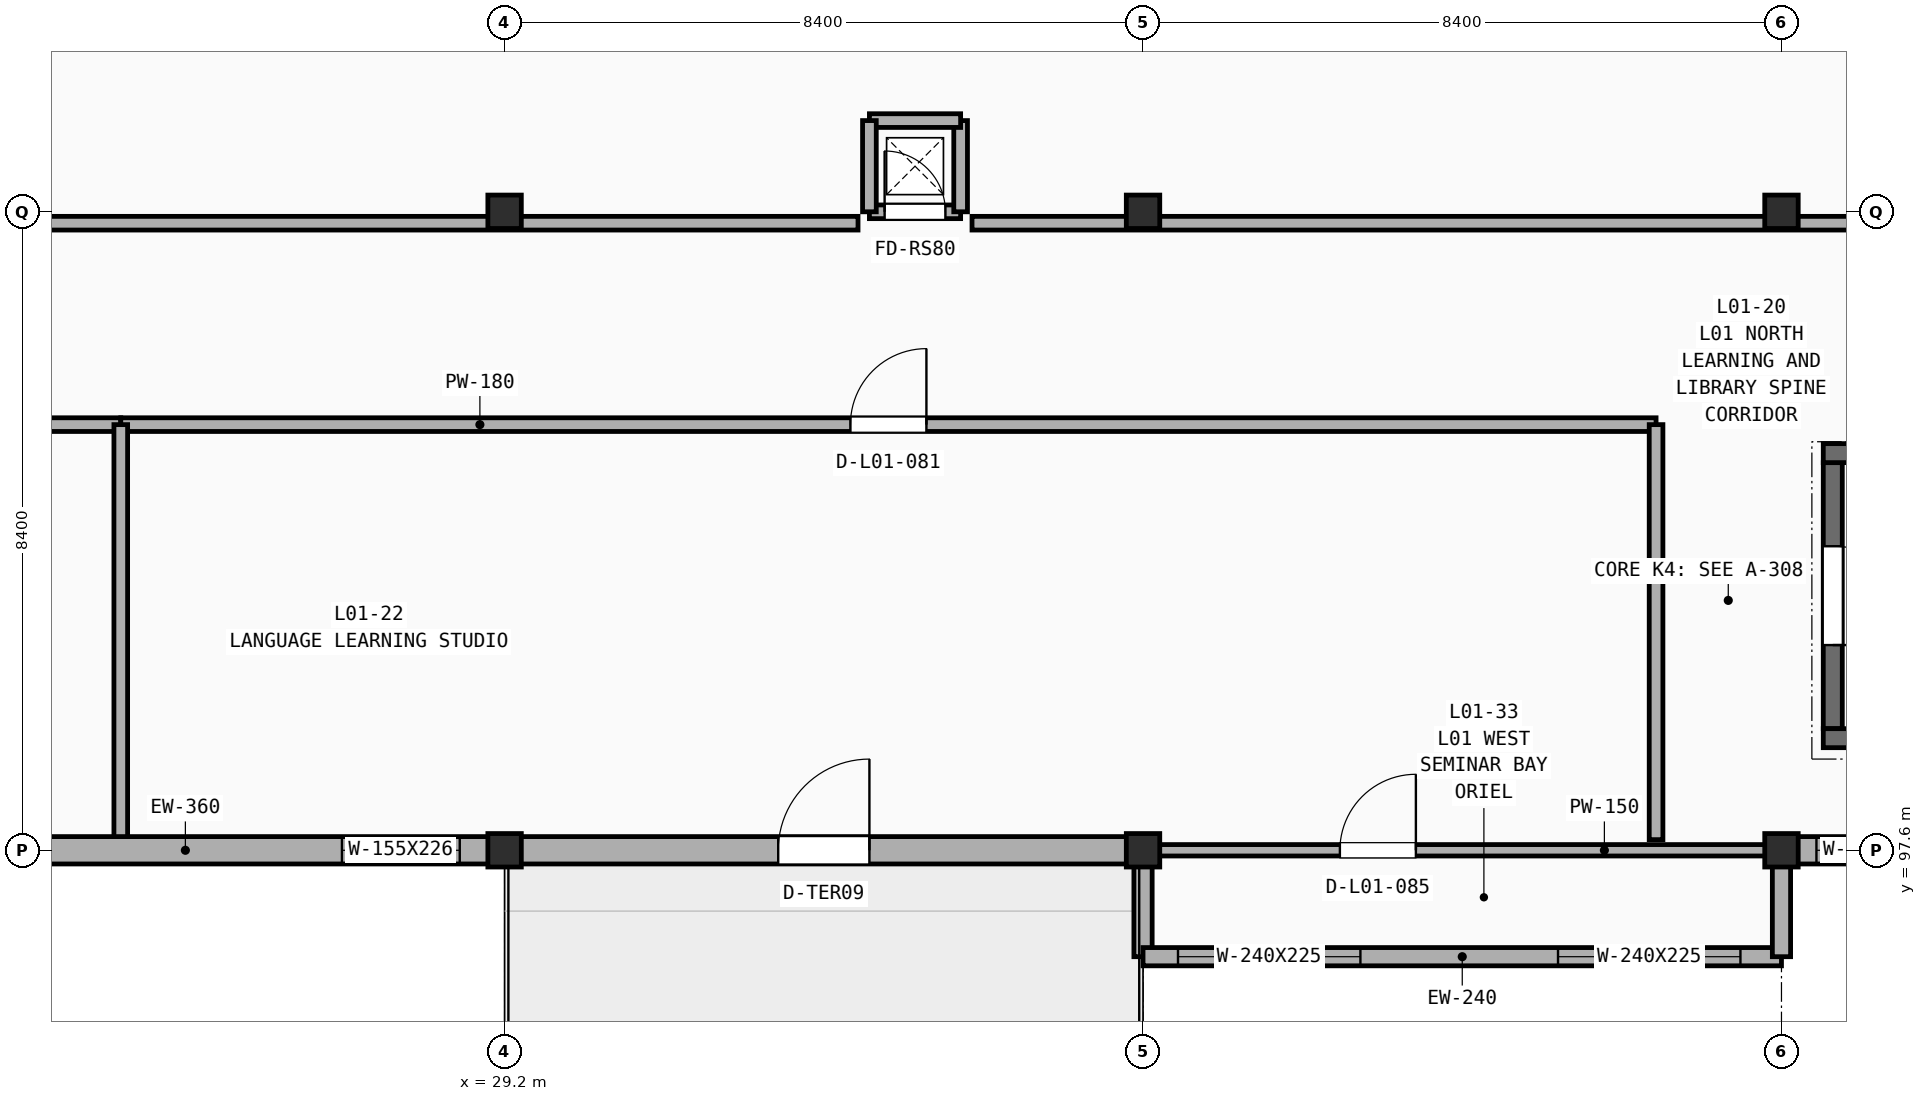
"""IFC4 building model, lengths in metres.
Left out: names, types, materials, properties, quantities, classifications, styles, units other than length and angle.
Written with IfcOpenShell. Run it as: python <this file> out.ifc"""

import sys

from ifc_helpers import new_model, si_unit, direction, frame, frame_2d, origin, origin_2d, place, context, subcontext, project, spatial, rectangle, extrude, element, fill, save


model = new_model("IFC4")
c1 = context("Model", 3, precision=1e-05, world=origin(), true_north=direction((0.0, 1.0)))
c2 = subcontext(c1, "Body", "Model", "MODEL_VIEW")
j1 = project(units=[si_unit("LENGTHUNIT", "METRE"), si_unit("PLANEANGLEUNIT", "RADIAN")], contexts=[c1])
p1 = place(None, origin())
s1 = spatial("IfcSite", under=j1, at=p1, CompositionType="ELEMENT")
p2 = place(p1, origin())
s2 = spatial("IfcBuilding", under=s1, at=p2, CompositionType="ELEMENT")
p3 = place(p2, frame((0.0, 0.0, 5.4)))
s3 = spatial("IfcBuildingStorey", under=s2, at=p3, CompositionType="ELEMENT", Elevation=5.4)
for number, where, z_axis, x_axis in (
    (1, (29.2, 97.6, 0.0), (0.0, 0.0, 1.0), (1.0, 0.0, 0.0)),
    (2, (29.2, 106.0, 0.0), (0.0, 0.0, 1.0), (1.0, 0.0, 0.0)),
    (3, (37.6, 97.6, 0.0), (0.0, 0.0, 1.0), (1.0, 0.0, 0.0)),
    (4, (37.6, 106.0, 0.0), (0.0, 0.0, 1.0), (1.0, 0.0, 0.0)),
    (5, (46.0, 97.6, 0.0), (0.0, 0.0, 1.0), (1.0, 0.0, 0.0)),
    (6, (46.0, 106.0, 0.0), (0.0, 0.0, 1.0), (1.0, 0.0, 0.0)),
):
    element("IfcColumn", number, at=place(p3, frame(where, z_axis=z_axis, x_axis=x_axis)), inside=s3, PredefinedType="COLUMN", context=c2, shape_type="SweptSolid", body=[
        extrude(rectangle(XDim=0.44, YDim=0.44, at=origin_2d()), origin(), (0.0, 0.0, 1.0), 4.2),
    ])
p4 = place(p3, frame((4.14, 103.2, 0.0), z_axis=(0.0, 0.0, 1.0), x_axis=(1.0, 0.0, 0.0)))
e7 = element("IfcWall", 7, at=p4, inside=s3, PredefinedType="PARTITIONING", context=c2, shape_type="SweptSolid", body=[
    extrude(rectangle(XDim=20.01, YDim=0.18, at=frame_2d((10.005, 0.0))), origin(), (0.0, 0.0, 1.0), 3.37),
])
p5 = place(p4, frame((9.505, 0.0, -0.01)))
e8 = element("IfcOpeningElement", 8, at=p5, cuts=e7, PredefinedType="OPENING", context=c2, shape_type="SweptSolid", body=[
    extrude(rectangle(XDim=1.0, YDim=2.16, at=frame_2d((0.5, 1.08))), frame((0.0, 0.1, 0.0), z_axis=(0.0, -1.0, 0.0), x_axis=(1.0, 0.0, 0.0)), (0.0, 0.0, 1.0), 0.2),
])
p6 = place(p3, frame((24.15, 103.2, 0.0), z_axis=(0.0, 0.0, 1.0), x_axis=(1.0, 0.0, 0.0)))
e9 = element("IfcWall", 9, at=p6, inside=s3, PredefinedType="PARTITIONING", context=c2, shape_type="SweptSolid", body=[
    extrude(rectangle(XDim=20.2, YDim=0.18, at=frame_2d((10.1, 0.0))), origin(), (0.0, 0.0, 1.0), 3.37),
])
p7 = place(p6, frame((9.6, 0.0, -0.01)))
e10 = element("IfcOpeningElement", 10, at=p7, cuts=e9, PredefinedType="OPENING", context=c2, shape_type="SweptSolid", body=[
    extrude(rectangle(XDim=1.0, YDim=2.16, at=frame_2d((0.5, 1.08))), frame((0.0, 0.1, 0.0), z_axis=(0.0, -1.0, 0.0), x_axis=(1.0, 0.0, 0.0)), (0.0, 0.0, 1.0), 0.2),
])
for number, where, z_axis, x_axis in (
    (11, (24.15, 97.74, 0.0), (0.0, 0.0, 1.0), (0.0, 1.0, 0.0)),
    (12, (44.35, 97.74, 0.0), (0.0, 0.0, 1.0), (0.0, 1.0, 0.0)),
):
    element("IfcWall", number, at=place(p3, frame(where, z_axis=z_axis, x_axis=x_axis)), inside=s3, PredefinedType="PARTITIONING", context=c2, shape_type="SweptSolid", body=[
        extrude(rectangle(XDim=5.46, YDim=0.18, at=frame_2d((2.73, 0.0))), origin(), (0.0, 0.0, 1.0), 3.52),
    ])
p8 = place(p3, frame((37.6, 97.6, 0.0), z_axis=(0.0, 0.0, 1.0), x_axis=(1.0, 0.0, 0.0)))
e13 = element("IfcWall", 13, at=p8, inside=s3, PredefinedType="PARTITIONING", context=c2, shape_type="SweptSolid", body=[
    extrude(rectangle(XDim=8.4, YDim=0.15, at=frame_2d((4.2, 0.0))), origin(), (0.0, 0.0, 1.0), 3.15),
])
p9 = place(p8, frame((2.59, 0.0, -0.01)))
e14 = element("IfcOpeningElement", 14, at=p9, cuts=e13, PredefinedType="OPENING", context=c2, shape_type="SweptSolid", body=[
    extrude(rectangle(XDim=1.0, YDim=2.16, at=frame_2d((0.5, 1.08))), frame((0.0, 0.085, 0.0), z_axis=(0.0, -1.0, 0.0), x_axis=(1.0, 0.0, 0.0)), (0.0, 0.0, 1.0), 0.17),
])
p10 = place(p3, frame((4.14, 105.85, 0.0), z_axis=(0.0, 0.0, 1.0), x_axis=(1.0, 0.0, 0.0)))
e15 = element("IfcWall", 15, at=p10, inside=s3, PredefinedType="PARTITIONING", context=c2, shape_type="SweptSolid", body=[
    extrude(rectangle(XDim=29.71, YDim=0.18, at=frame_2d((14.855, 0.0))), origin(), (0.0, 0.0, 1.0), 3.25),
])
p11 = place(p10, frame((12.649, 0.0, -0.01)))
e16 = element("IfcOpeningElement", 16, at=p11, cuts=e15, PredefinedType="OPENING", context=c2, shape_type="SweptSolid", body=[
    extrude(rectangle(XDim=1.6, YDim=2.21, at=frame_2d((0.8, 1.105))), frame((0.0, 0.1, 0.0), z_axis=(0.0, -1.0, 0.0), x_axis=(1.0, 0.0, 0.0)), (0.0, 0.0, 1.0), 0.2),
])
p12 = place(p3, frame((35.35, 105.85, 0.0), z_axis=(0.0, 0.0, 1.0), x_axis=(1.0, 0.0, 0.0)))
e17 = element("IfcWall", 17, at=p12, inside=s3, PredefinedType="PARTITIONING", context=c2, shape_type="SweptSolid", body=[
    extrude(rectangle(XDim=17.7, YDim=0.18, at=frame_2d((8.85, 0.0))), origin(), (0.0, 0.0, 1.0), 3.25),
])
p13 = place(p3, frame((20.8, 97.6, 0.0), z_axis=(0.0, 0.0, 1.0), x_axis=(1.0, 0.0, 0.0)))
e18 = element("IfcWall", 18, at=p13, inside=s3, PredefinedType="SOLIDWALL", context=c2, shape_type="SweptSolid", body=[
    extrude(rectangle(XDim=8.4, YDim=0.36, at=frame_2d((4.2, 0.0))), origin(), (0.0, 0.0, 1.0), 3.15),
])
p14 = place(p13, frame((0.46, 0.0, 0.75)))
e19 = element("IfcOpeningElement", 19, at=p14, cuts=e18, PredefinedType="OPENING", context=c2, shape_type="SweptSolid", body=[
    extrude(rectangle(XDim=1.55, YDim=2.26, at=frame_2d((0.775, 1.13))), frame((0.0, 0.19, 0.0), z_axis=(0.0, -1.0, 0.0), x_axis=(1.0, 0.0, 0.0)), (0.0, 0.0, 1.0), 0.38),
])
p15 = place(p13, frame((6.26, 0.0, 0.75)))
e20 = element("IfcOpeningElement", 20, at=p15, cuts=e18, PredefinedType="OPENING", context=c2, shape_type="SweptSolid", body=[
    extrude(rectangle(XDim=1.55, YDim=2.26, at=frame_2d((0.775, 1.13))), frame((0.0, 0.19, 0.0), z_axis=(0.0, -1.0, 0.0), x_axis=(1.0, 0.0, 0.0)), (0.0, 0.0, 1.0), 0.38),
])
p16 = place(p3, frame((29.2, 97.6, 0.0), z_axis=(0.0, 0.0, 1.0), x_axis=(1.0, 0.0, 0.0)))
e21 = element("IfcWall", 21, at=p16, inside=s3, PredefinedType="SOLIDWALL", context=c2, shape_type="SweptSolid", body=[
    extrude(rectangle(XDim=8.4, YDim=0.36, at=frame_2d((4.2, 0.0))), origin(), (0.0, 0.0, 1.0), 3.15),
])
p17 = place(p16, frame((3.6, 0.0, -0.01)))
e22 = element("IfcOpeningElement", 22, at=p17, cuts=e21, PredefinedType="OPENING", context=c2, shape_type="SweptSolid", body=[
    extrude(rectangle(XDim=1.2, YDim=2.21, at=frame_2d((0.6, 1.105))), frame((0.0, 0.19, 0.0), z_axis=(0.0, -1.0, 0.0), x_axis=(1.0, 0.0, 0.0)), (0.0, 0.0, 1.0), 0.38),
])
p18 = place(p3, frame((46.0, 97.6, 0.0), z_axis=(0.0, 0.0, 1.0), x_axis=(1.0, 0.0, 0.0)))
e23 = element("IfcWall", 23, at=p18, inside=s3, PredefinedType="SOLIDWALL", context=c2, shape_type="SweptSolid", body=[
    extrude(rectangle(XDim=4.8, YDim=0.36, at=frame_2d((2.4, 0.0))), origin(), (0.0, 0.0, 1.0), 3.37),
])
p19 = place(p18, frame((0.46, 0.0, 0.75)))
e24 = element("IfcOpeningElement", 24, at=p19, cuts=e23, PredefinedType="OPENING", context=c2, shape_type="SweptSolid", body=[
    extrude(rectangle(XDim=1.55, YDim=2.45, at=frame_2d((0.775, 1.225))), frame((0.0, 0.19, 0.0), z_axis=(0.0, -1.0, 0.0), x_axis=(1.0, 0.0, 0.0)), (0.0, 0.0, 1.0), 0.38),
])
p20 = place(p18, frame((2.66, 0.0, 0.75)))
e25 = element("IfcOpeningElement", 25, at=p20, cuts=e23, PredefinedType="OPENING", context=c2, shape_type="SweptSolid", body=[
    extrude(rectangle(XDim=1.55, YDim=2.45, at=frame_2d((0.775, 1.225))), frame((0.0, 0.19, 0.0), z_axis=(0.0, -1.0, 0.0), x_axis=(1.0, 0.0, 0.0)), (0.0, 0.0, 1.0), 0.38),
])
p21 = place(p3, frame((37.6, 97.45, 0.0), z_axis=(0.0, 0.0, 1.0), x_axis=(0.0, -1.0, 0.0)))
e26 = element("IfcWall", 26, at=p21, inside=s3, PredefinedType="SOLIDWALL", context=c2, shape_type="SweptSolid", body=[
    extrude(rectangle(XDim=1.25, YDim=0.24, at=frame_2d((0.625, 0.0))), origin(), (0.0, 0.0, 1.0), 3.15),
])
p22 = place(p3, frame((37.6, 96.2, 0.0), z_axis=(0.0, 0.0, 1.0), x_axis=(1.0, 0.0, 0.0)))
e27 = element("IfcWall", 27, at=p22, inside=s3, PredefinedType="SOLIDWALL", context=c2, shape_type="SweptSolid", body=[
    extrude(rectangle(XDim=8.4, YDim=0.24, at=frame_2d((4.2, 0.0))), origin(), (0.0, 0.0, 1.0), 3.15),
])
p23 = place(p22, frame((0.46, 0.0, 0.65)))
e28 = element("IfcOpeningElement", 28, at=p23, cuts=e27, PredefinedType="OPENING", context=c2, shape_type="SweptSolid", body=[
    extrude(rectangle(XDim=2.4, YDim=2.25, at=frame_2d((1.2, 1.125))), frame((0.0, 0.13, 0.0), z_axis=(0.0, -1.0, 0.0), x_axis=(1.0, 0.0, 0.0)), (0.0, 0.0, 1.0), 0.26),
])
p24 = place(p22, frame((5.46, 0.0, 0.65)))
e29 = element("IfcOpeningElement", 29, at=p24, cuts=e27, PredefinedType="OPENING", context=c2, shape_type="SweptSolid", body=[
    extrude(rectangle(XDim=2.4, YDim=2.25, at=frame_2d((1.2, 1.125))), frame((0.0, 0.13, 0.0), z_axis=(0.0, -1.0, 0.0), x_axis=(1.0, 0.0, 0.0)), (0.0, 0.0, 1.0), 0.26),
])
p25 = place(p3, frame((46.0, 96.2, 0.0), z_axis=(0.0, 0.0, 1.0), x_axis=(0.0, 1.0, 0.0)))
e30 = element("IfcWall", 30, at=p25, inside=s3, PredefinedType="SOLIDWALL", context=c2, shape_type="SweptSolid", body=[
    extrude(rectangle(XDim=1.25, YDim=0.24, at=frame_2d((0.625, 0.0))), origin(), (0.0, 0.0, 1.0), 3.15),
])
p26 = place(p3, frame((46.675, 102.7, 0.0), z_axis=(0.0, 0.0, 1.0), x_axis=(0.0, -1.0, 0.0)))
e31 = element("IfcWall", 31, at=p26, inside=s3, PredefinedType="SHEAR", context=c2, shape_type="SweptSolid", body=[
    extrude(rectangle(XDim=3.5, YDim=0.25, at=frame_2d((1.75, 0.0))), origin(), (0.0, 0.0, 1.0), 4.2),
])
p27 = place(p26, frame((1.1, 0.0, -0.01)))
e32 = element("IfcOpeningElement", 32, at=p27, cuts=e31, PredefinedType="OPENING", context=c2, shape_type="SweptSolid", body=[
    extrude(rectangle(XDim=1.3, YDim=2.16, at=frame_2d((0.65, 1.08))), frame((0.0, 0.135, 0.0), z_axis=(0.0, -1.0, 0.0), x_axis=(1.0, 0.0, 0.0)), (0.0, 0.0, 1.0), 0.27),
])
for number, where, z_axis, x_axis in (
    (33, (46.55, 99.075, 0.0), (0.0, 0.0, 1.0), (1.0, 0.0, 0.0)),
    (34, (46.55, 102.825, 0.0), (0.0, 0.0, 1.0), (1.0, 0.0, 0.0)),
):
    element("IfcWall", number, at=place(p3, frame(where, z_axis=z_axis, x_axis=x_axis)), inside=s3, PredefinedType="SHEAR", context=c2, shape_type="SweptSolid", body=[
        extrude(rectangle(XDim=8.9, YDim=0.25, at=frame_2d((4.45, 0.0))), origin(), (0.0, 0.0, 1.0), 4.2),
    ])
p28 = place(p3, frame((34.0, 106.0, 0.0), z_axis=(0.0, 0.0, 1.0), x_axis=(1.0, 0.0, 0.0)))
e35 = element("IfcWall", 35, at=p28, inside=s3, PredefinedType="SOLIDWALL", context=c2, shape_type="SweptSolid", body=[
    extrude(rectangle(XDim=1.2, YDim=0.18, at=frame_2d((0.6, 0.0))), origin(), (0.0, 0.0, 1.0), 3.97),
])
p29 = place(p28, frame((0.2, 0.0, -0.01)))
e36 = element("IfcOpeningElement", 36, at=p29, cuts=e35, PredefinedType="OPENING", context=c2, shape_type="SweptSolid", body=[
    extrude(rectangle(XDim=0.8, YDim=2.06, at=frame_2d((0.4, 1.03))), frame((0.0, 0.1, 0.0), z_axis=(0.0, -1.0, 0.0), x_axis=(1.0, 0.0, 0.0)), (0.0, 0.0, 1.0), 0.2),
])
for number, where, z_axis, x_axis in (
    (37, (35.2, 106.0, 0.0), (0.0, 0.0, 1.0), (0.0, 1.0, 0.0)),
    (38, (35.2, 107.2, 0.0), (0.0, 0.0, 1.0), (-1.0, 0.0, 0.0)),
    (39, (34.0, 107.2, 0.0), (0.0, 0.0, 1.0), (0.0, -1.0, 0.0)),
):
    element("IfcWall", number, at=place(p3, frame(where, z_axis=z_axis, x_axis=x_axis)), inside=s3, PredefinedType="SOLIDWALL", context=c2, shape_type="SweptSolid", body=[
        extrude(rectangle(XDim=1.2, YDim=0.18, at=frame_2d((0.6, 0.0))), origin(), (0.0, 0.0, 1.0), 3.97),
    ])
p30 = place(p7, frame((1.0, 0.0, 0.01), z_axis=(0.0, 0.0, 1.0), x_axis=(-1.0, 0.0, 0.0)))
e40 = element("IfcDoor", 40, at=p30, inside=s3, OperationType="SINGLE_SWING_RIGHT", PredefinedType="DOOR", context=c2, shape_type="SweptSolid", body=[
    extrude(rectangle(XDim=1.0, YDim=2.15, at=frame_2d((0.5, 1.075))), frame((0.0, 0.025, 0.0), z_axis=(0.0, -1.0, 0.0), x_axis=(1.0, 0.0, 0.0)), (0.0, 0.0, 1.0), 0.05),
])
fill(e10, e40)
p31 = place(p9, frame((0.0, 0.0, 0.01)))
e41 = element("IfcDoor", 41, at=p31, inside=s3, OperationType="SINGLE_SWING_RIGHT", PredefinedType="DOOR", context=c2, shape_type="SweptSolid", body=[
    extrude(rectangle(XDim=1.0, YDim=2.15, at=frame_2d((0.5, 1.075))), frame((0.0, 0.025, 0.0), z_axis=(0.0, -1.0, 0.0), x_axis=(1.0, 0.0, 0.0)), (0.0, 0.0, 1.0), 0.05),
])
fill(e14, e41)
p32 = place(p15, origin())
e42 = element("IfcWindow", 42, at=p32, inside=s3, PartitioningType="DOUBLE_PANEL_HORIZONTAL", PredefinedType="WINDOW", context=c2, shape_type="SweptSolid", body=[
    extrude(rectangle(XDim=1.55, YDim=2.26, at=frame_2d((0.775, 1.13))), frame((0.0, 0.03, 0.0), z_axis=(0.0, -1.0, 0.0), x_axis=(1.0, 0.0, 0.0)), (0.0, 0.0, 1.0), 0.06),
])
fill(e20, e42)
p33 = place(p17, frame((0.0, 0.0, 0.01)))
e43 = element("IfcDoor", 43, at=p33, inside=s3, OperationType="SINGLE_SWING_RIGHT", PredefinedType="DOOR", context=c2, shape_type="SweptSolid", body=[
    extrude(rectangle(XDim=1.2, YDim=2.2, at=frame_2d((0.6, 1.1))), frame((0.0, 0.025, 0.0), z_axis=(0.0, -1.0, 0.0), x_axis=(1.0, 0.0, 0.0)), (0.0, 0.0, 1.0), 0.05),
])
fill(e22, e43)
p34 = place(p19, origin())
e44 = element("IfcWindow", 44, at=p34, inside=s3, PartitioningType="DOUBLE_PANEL_HORIZONTAL", PredefinedType="WINDOW", context=c2, shape_type="SweptSolid", body=[
    extrude(rectangle(XDim=1.55, YDim=2.45, at=frame_2d((0.775, 1.225))), frame((0.0, 0.03, 0.0), z_axis=(0.0, -1.0, 0.0), x_axis=(1.0, 0.0, 0.0)), (0.0, 0.0, 1.0), 0.06),
])
fill(e24, e44)
p35 = place(p23, origin())
e45 = element("IfcWindow", 45, at=p35, inside=s3, PartitioningType="TRIPLE_PANEL_VERTICAL", PredefinedType="WINDOW", context=c2, shape_type="SweptSolid", body=[
    extrude(rectangle(XDim=2.4, YDim=2.25, at=frame_2d((1.2, 1.125))), frame((0.0, 0.03, 0.0), z_axis=(0.0, -1.0, 0.0), x_axis=(1.0, 0.0, 0.0)), (0.0, 0.0, 1.0), 0.06),
])
fill(e28, e45)
p36 = place(p24, origin())
e46 = element("IfcWindow", 46, at=p36, inside=s3, PartitioningType="TRIPLE_PANEL_VERTICAL", PredefinedType="WINDOW", context=c2, shape_type="SweptSolid", body=[
    extrude(rectangle(XDim=2.4, YDim=2.25, at=frame_2d((1.2, 1.125))), frame((0.0, 0.03, 0.0), z_axis=(0.0, -1.0, 0.0), x_axis=(1.0, 0.0, 0.0)), (0.0, 0.0, 1.0), 0.06),
])
fill(e29, e46)
p37 = place(p27, frame((0.0, 0.0, 0.01)))
e47 = element("IfcDoor", 47, at=p37, inside=s3, OperationType="SINGLE_SWING_RIGHT", PredefinedType="DOOR", context=c2, shape_type="SweptSolid", body=[
    extrude(rectangle(XDim=1.3, YDim=2.15, at=frame_2d((0.65, 1.075))), frame((0.0, 0.025, 0.0), z_axis=(0.0, -1.0, 0.0), x_axis=(1.0, 0.0, 0.0)), (0.0, 0.0, 1.0), 0.05),
])
fill(e32, e47)
p38 = place(p29, frame((0.0, 0.0, 0.01)))
e48 = element("IfcDoor", 48, at=p38, inside=s3, OperationType="SINGLE_SWING_LEFT", PredefinedType="DOOR", context=c2, shape_type="SweptSolid", body=[
    extrude(rectangle(XDim=0.8, YDim=2.05, at=frame_2d((0.4, 1.025))), frame((0.0, 0.025, 0.0), z_axis=(0.0, -1.0, 0.0), x_axis=(1.0, 0.0, 0.0)), (0.0, 0.0, 1.0), 0.05),
])
fill(e36, e48)
save(model, sys.argv[1])
